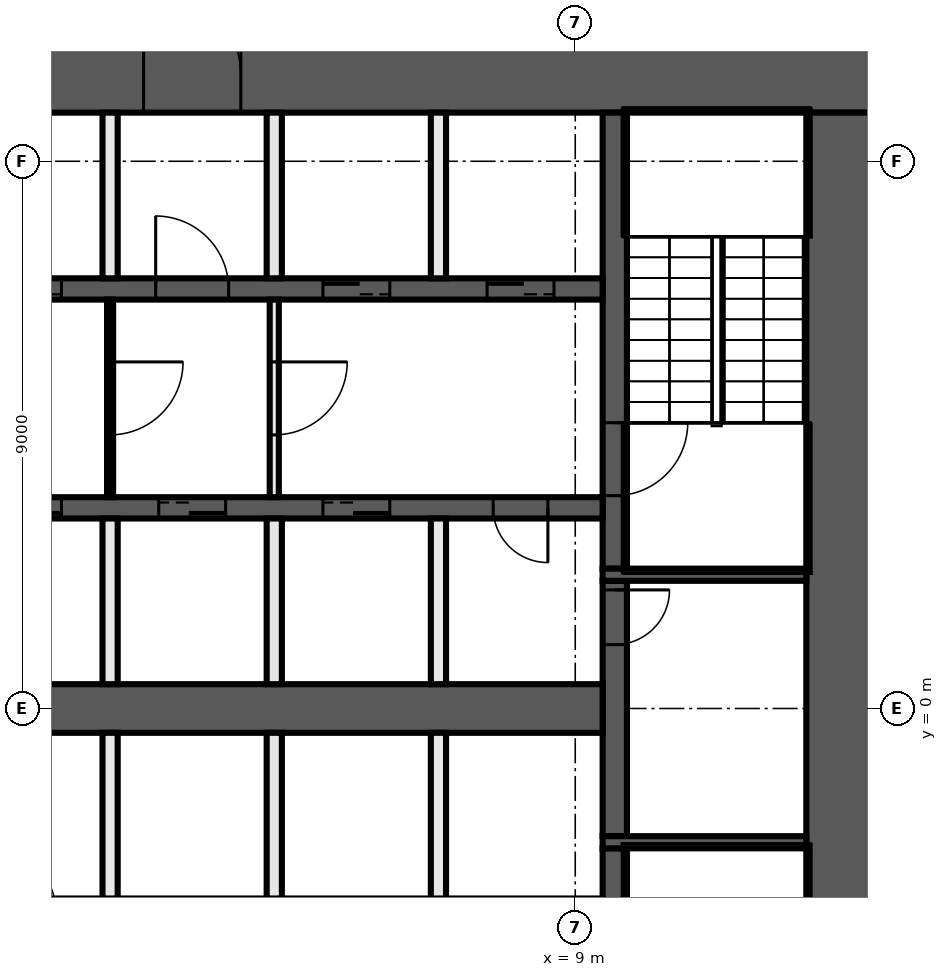
"""IFC4 building model, lengths in metres.
Left out: names, types, materials, properties, quantities, classifications, styles, units other than length and angle.
Written with IfcOpenShell. Run it as: python <this file> out.ifc"""

import sys

from ifc_helpers import new_model, si_unit, direction, frame, frame_2d, origin, place, context, subcontext, project, spatial, rectangle, extrude, element, fill, save


model = new_model("IFC4")
c1 = context("Model", 3, precision=1e-05, world=origin(), true_north=direction((0.0, 1.0)))
c2 = subcontext(c1, "Body", "Model", "MODEL_VIEW")
j1 = project(units=[si_unit("LENGTHUNIT", "METRE"), si_unit("PLANEANGLEUNIT", "RADIAN")], contexts=[c1])
p1 = place(None, origin())
s1 = spatial("IfcSite", under=j1, at=p1, CompositionType="ELEMENT")
p2 = place(p1, origin())
s2 = spatial("IfcBuilding", under=s1, at=p2, CompositionType="ELEMENT")
p3 = place(p2, frame((0.0, 0.0, 9.0)))
s3 = spatial("IfcBuildingStorey", under=s2, at=p3, CompositionType="ELEMENT", Elevation=9.0)
p4 = place(p3, frame((-14.0, 10.4, 0.0), z_axis=(0.0, 0.0, 1.0), x_axis=(1.0, 0.0, 0.0)))
e1 = element("IfcWall", 1, at=p4, inside=s3, PredefinedType="SHEAR", context=c2, shape_type="SweptSolid", body=[
    extrude(rectangle(XDim=28.0, YDim=1.2, at=frame_2d((14.0, 0.0))), origin(), (0.0, 0.0, 1.0), 9.55),
])
p5 = place(p4, frame((15.9, 0.0, 0.0)))
e2 = element("IfcOpeningElement", 2, at=p5, cuts=e1, PredefinedType="OPENING", context=c2, shape_type="SweptSolid", body=[
    extrude(rectangle(XDim=1.6, YDim=2.1, at=frame_2d((0.8, 1.05))), frame((0.0, 0.61, 0.0), z_axis=(0.0, -1.0, 0.0), x_axis=(1.0, 0.0, 0.0)), (0.0, 0.0, 1.0), 1.22),
])
p6 = place(p3, frame((13.4, 9.8, 0.0), z_axis=(0.0, 0.0, 1.0), x_axis=(0.0, -1.0, 0.0)))
e3 = element("IfcWall", 3, at=p6, inside=s3, PredefinedType="SHEAR", context=c2, shape_type="SweptSolid", body=[
    extrude(rectangle(XDim=19.6, YDim=1.2, at=frame_2d((9.8, 0.0))), origin(), (0.0, 0.0, 1.0), 9.55),
])
p7 = place(p3, frame((9.65, -2.3, 0.0), z_axis=(0.0, 0.0, 1.0), x_axis=(0.0, -1.0, 0.0)))
e4 = element("IfcWall", 4, at=p7, inside=s3, PredefinedType="SHEAR", context=c2, shape_type="SweptSolid", body=[
    extrude(rectangle(XDim=7.5, YDim=0.4, at=frame_2d((3.75, 0.0))), origin(), (0.0, 0.0, 1.0), 9.55),
])
p8 = place(p7, frame((1.2, 0.0, 0.0)))
e5 = element("IfcOpeningElement", 5, at=p8, cuts=e4, PredefinedType="OPENING", context=c2, shape_type="SweptSolid", body=[
    extrude(rectangle(XDim=1.2, YDim=2.1, at=frame_2d((0.6, 1.05))), frame((0.0, 0.21, 0.0), z_axis=(0.0, -1.0, 0.0), x_axis=(1.0, 0.0, 0.0)), (0.0, 0.0, 1.0), 0.42),
])
p9 = place(p3, frame((9.65, 2.1, 0.0), z_axis=(0.0, 0.0, 1.0), x_axis=(0.0, -1.0, 0.0)))
e6 = element("IfcWall", 6, at=p9, inside=s3, PredefinedType="SHEAR", context=c2, shape_type="SweptSolid", body=[
    extrude(rectangle(XDim=4.2, YDim=0.4, at=frame_2d((2.1, 0.0))), origin(), (0.0, 0.0, 1.0), 9.55),
])
p10 = place(p9, frame((0.15, 0.0, 0.0)))
e7 = element("IfcOpeningElement", 7, at=p10, cuts=e6, PredefinedType="OPENING", context=c2, shape_type="SweptSolid", body=[
    extrude(rectangle(XDim=0.9, YDim=2.1, at=frame_2d((0.45, 1.05))), frame((0.0, 0.21, 0.0), z_axis=(0.0, -1.0, 0.0), x_axis=(1.0, 0.0, 0.0)), (0.0, 0.0, 1.0), 0.42),
])
p11 = place(p3, frame((9.65, 9.8, 0.0), z_axis=(0.0, 0.0, 1.0), x_axis=(0.0, -1.0, 0.0)))
e8 = element("IfcWall", 8, at=p11, inside=s3, PredefinedType="SHEAR", context=c2, shape_type="SweptSolid", body=[
    extrude(rectangle(XDim=7.5, YDim=0.4, at=frame_2d((3.75, 0.0))), origin(), (0.0, 0.0, 1.0), 9.55),
])
p12 = place(p11, frame((5.1, 0.0, 0.0)))
e9 = element("IfcOpeningElement", 9, at=p12, cuts=e8, PredefinedType="OPENING", context=c2, shape_type="SweptSolid", body=[
    extrude(rectangle(XDim=1.2, YDim=2.1, at=frame_2d((0.6, 1.05))), frame((0.0, 0.21, 0.0), z_axis=(0.0, -1.0, 0.0), x_axis=(1.0, 0.0, 0.0)), (0.0, 0.0, 1.0), 0.42),
])
for number, where, z_axis, x_axis in (
    (10, (9.45, 2.2, 0.0), (0.0, 0.0, 1.0), (1.0, 0.0, 0.0)),
    (11, (9.45, -2.2, 0.0), (0.0, 0.0, 1.0), (1.0, 0.0, 0.0)),
):
    element("IfcWall", number, at=place(p3, frame(where, z_axis=z_axis, x_axis=x_axis)), inside=s3, PredefinedType="SHEAR", context=c2, shape_type="SweptSolid", body=[
        extrude(rectangle(XDim=3.35, YDim=0.2, at=frame_2d((1.675, 0.0))), origin(), (0.0, 0.0, 1.0), 9.55),
    ])
p13 = place(p3, frame((-9.45, 6.9, 0.0), z_axis=(0.0, 0.0, 1.0), x_axis=(1.0, 0.0, 0.0)))
e12 = element("IfcWall", 12, at=p13, inside=s3, PredefinedType="SHEAR", context=c2, shape_type="SweptSolid", body=[
    extrude(rectangle(XDim=18.9, YDim=0.35, at=frame_2d((9.45, 0.0))), origin(), (0.0, 0.0, 1.0), 9.55),
])
p14 = place(p13, frame((0.8, 0.0, 0.0)))
e13 = element("IfcOpeningElement", 13, at=p14, cuts=e12, PredefinedType="OPENING", context=c2, shape_type="SweptSolid", body=[
    extrude(rectangle(XDim=1.1, YDim=2.1, at=frame_2d((0.55, 1.05))), frame((0.0, 0.185, 0.0), z_axis=(0.0, -1.0, 0.0), x_axis=(1.0, 0.0, 0.0)), (0.0, 0.0, 1.0), 0.37),
])
p15 = place(p13, frame((3.5, 0.0, 0.0)))
e14 = element("IfcOpeningElement", 14, at=p15, cuts=e12, PredefinedType="OPENING", context=c2, shape_type="SweptSolid", body=[
    extrude(rectangle(XDim=1.1, YDim=2.1, at=frame_2d((0.55, 1.05))), frame((0.0, 0.185, 0.0), z_axis=(0.0, -1.0, 0.0), x_axis=(1.0, 0.0, 0.0)), (0.0, 0.0, 1.0), 0.37),
])
p16 = place(p13, frame((6.2, 0.0, 0.0)))
e15 = element("IfcOpeningElement", 15, at=p16, cuts=e12, PredefinedType="OPENING", context=c2, shape_type="SweptSolid", body=[
    extrude(rectangle(XDim=1.1, YDim=2.1, at=frame_2d((0.55, 1.05))), frame((0.0, 0.185, 0.0), z_axis=(0.0, -1.0, 0.0), x_axis=(1.0, 0.0, 0.0)), (0.0, 0.0, 1.0), 0.37),
])
p17 = place(p13, frame((8.9, 0.0, 0.0)))
e16 = element("IfcOpeningElement", 16, at=p17, cuts=e12, PredefinedType="OPENING", context=c2, shape_type="SweptSolid", body=[
    extrude(rectangle(XDim=1.1, YDim=2.1, at=frame_2d((0.55, 1.05))), frame((0.0, 0.185, 0.0), z_axis=(0.0, -1.0, 0.0), x_axis=(1.0, 0.0, 0.0)), (0.0, 0.0, 1.0), 0.37),
])
p18 = place(p13, frame((11.55, 0.0, 0.0)))
e17 = element("IfcOpeningElement", 17, at=p18, cuts=e12, PredefinedType="OPENING", context=c2, shape_type="SweptSolid", body=[
    extrude(rectangle(XDim=1.2, YDim=2.1, at=frame_2d((0.6, 1.05))), frame((0.0, 0.185, 0.0), z_axis=(0.0, -1.0, 0.0), x_axis=(1.0, 0.0, 0.0)), (0.0, 0.0, 1.0), 0.37),
])
p19 = place(p13, frame((14.3, 0.0, 0.0)))
e18 = element("IfcOpeningElement", 18, at=p19, cuts=e12, PredefinedType="OPENING", context=c2, shape_type="SweptSolid", body=[
    extrude(rectangle(XDim=1.1, YDim=2.1, at=frame_2d((0.55, 1.05))), frame((0.0, 0.185, 0.0), z_axis=(0.0, -1.0, 0.0), x_axis=(1.0, 0.0, 0.0)), (0.0, 0.0, 1.0), 0.37),
])
p20 = place(p13, frame((17.0, 0.0, 0.0)))
e19 = element("IfcOpeningElement", 19, at=p20, cuts=e12, PredefinedType="OPENING", context=c2, shape_type="SweptSolid", body=[
    extrude(rectangle(XDim=1.1, YDim=2.1, at=frame_2d((0.55, 1.05))), frame((0.0, 0.185, 0.0), z_axis=(0.0, -1.0, 0.0), x_axis=(1.0, 0.0, 0.0)), (0.0, 0.0, 1.0), 0.37),
])
p21 = place(p3, frame((9.45, 3.3, 0.0), z_axis=(0.0, 0.0, 1.0), x_axis=(-1.0, 0.0, 0.0)))
e20 = element("IfcWall", 20, at=p21, inside=s3, PredefinedType="SHEAR", context=c2, shape_type="SweptSolid", body=[
    extrude(rectangle(XDim=18.9, YDim=0.35, at=frame_2d((9.45, 0.0))), origin(), (0.0, 0.0, 1.0), 9.55),
])
p22 = place(p21, frame((17.0, 0.0, 0.0)))
e21 = element("IfcOpeningElement", 21, at=p22, cuts=e20, PredefinedType="OPENING", context=c2, shape_type="SweptSolid", body=[
    extrude(rectangle(XDim=1.1, YDim=2.1, at=frame_2d((0.55, 1.05))), frame((0.0, 0.185, 0.0), z_axis=(0.0, -1.0, 0.0), x_axis=(1.0, 0.0, 0.0)), (0.0, 0.0, 1.0), 0.37),
])
p23 = place(p21, frame((14.3, 0.0, 0.0)))
e22 = element("IfcOpeningElement", 22, at=p23, cuts=e20, PredefinedType="OPENING", context=c2, shape_type="SweptSolid", body=[
    extrude(rectangle(XDim=1.1, YDim=2.1, at=frame_2d((0.55, 1.05))), frame((0.0, 0.185, 0.0), z_axis=(0.0, -1.0, 0.0), x_axis=(1.0, 0.0, 0.0)), (0.0, 0.0, 1.0), 0.37),
])
p24 = place(p21, frame((11.6, 0.0, 0.0)))
e23 = element("IfcOpeningElement", 23, at=p24, cuts=e20, PredefinedType="OPENING", context=c2, shape_type="SweptSolid", body=[
    extrude(rectangle(XDim=1.1, YDim=2.1, at=frame_2d((0.55, 1.05))), frame((0.0, 0.185, 0.0), z_axis=(0.0, -1.0, 0.0), x_axis=(1.0, 0.0, 0.0)), (0.0, 0.0, 1.0), 0.37),
])
p25 = place(p21, frame((8.9, 0.0, 0.0)))
e24 = element("IfcOpeningElement", 24, at=p25, cuts=e20, PredefinedType="OPENING", context=c2, shape_type="SweptSolid", body=[
    extrude(rectangle(XDim=1.1, YDim=2.1, at=frame_2d((0.55, 1.05))), frame((0.0, 0.185, 0.0), z_axis=(0.0, -1.0, 0.0), x_axis=(1.0, 0.0, 0.0)), (0.0, 0.0, 1.0), 0.37),
])
p26 = place(p21, frame((6.2, 0.0, 0.0)))
e25 = element("IfcOpeningElement", 25, at=p26, cuts=e20, PredefinedType="OPENING", context=c2, shape_type="SweptSolid", body=[
    extrude(rectangle(XDim=1.1, YDim=2.1, at=frame_2d((0.55, 1.05))), frame((0.0, 0.185, 0.0), z_axis=(0.0, -1.0, 0.0), x_axis=(1.0, 0.0, 0.0)), (0.0, 0.0, 1.0), 0.37),
])
p27 = place(p21, frame((3.5, 0.0, 0.0)))
e26 = element("IfcOpeningElement", 26, at=p27, cuts=e20, PredefinedType="OPENING", context=c2, shape_type="SweptSolid", body=[
    extrude(rectangle(XDim=1.1, YDim=2.1, at=frame_2d((0.55, 1.05))), frame((0.0, 0.185, 0.0), z_axis=(0.0, -1.0, 0.0), x_axis=(1.0, 0.0, 0.0)), (0.0, 0.0, 1.0), 0.37),
])
p28 = place(p21, frame((0.9, 0.0, 0.0)))
e27 = element("IfcOpeningElement", 27, at=p28, cuts=e20, PredefinedType="OPENING", context=c2, shape_type="SweptSolid", body=[
    extrude(rectangle(XDim=0.9, YDim=2.1, at=frame_2d((0.45, 1.05))), frame((0.0, 0.185, 0.0), z_axis=(0.0, -1.0, 0.0), x_axis=(1.0, 0.0, 0.0)), (0.0, 0.0, 1.0), 0.37),
])
p29 = place(p3, frame((-9.45, 0.0, 0.0), z_axis=(0.0, 0.0, 1.0), x_axis=(1.0, 0.0, 0.0)))
e28 = element("IfcWall", 28, at=p29, inside=s3, PredefinedType="SHEAR", context=c2, shape_type="SweptSolid", body=[
    extrude(rectangle(XDim=18.9, YDim=0.8, at=frame_2d((9.45, 0.0))), origin(), (0.0, 0.0, 1.0), 9.55),
])
for number, where, z_axis, x_axis in (
    (29, (6.75, -3.125, 0.0), (0.0, 0.0, 1.0), (0.0, 1.0, 0.0)),
    (30, (6.75, 0.4, 0.0), (0.0, 0.0, 1.0), (0.0, 1.0, 0.0)),
    (31, (6.75, 7.075, 0.0), (0.0, 0.0, 1.0), (0.0, 1.0, 0.0)),
):
    element("IfcWall", number, at=place(p3, frame(where, z_axis=z_axis, x_axis=x_axis)), inside=s3, PredefinedType="SOLIDWALL", context=c2, shape_type="SweptSolid", body=[
        extrude(rectangle(XDim=2.725, YDim=0.25, at=frame_2d((1.363, 0.0))), origin(), (0.0, 0.0, 1.0), 9.55),
    ])
p30 = place(p3, frame((4.05, 6.725, 0.0), z_axis=(0.0, 0.0, 1.0), x_axis=(0.0, -1.0, 0.0)))
e32 = element("IfcWall", 32, at=p30, inside=s3, PredefinedType="PARTITIONING", context=c2, shape_type="SweptSolid", body=[
    extrude(rectangle(XDim=3.25, YDim=0.15, at=frame_2d((1.625, 0.0))), origin(), (0.0, 0.0, 1.0), 9.55),
])
p31 = place(p30, frame((1.025, 0.0, 0.0)))
e33 = element("IfcOpeningElement", 33, at=p31, cuts=e32, PredefinedType="OPENING", context=c2, shape_type="SweptSolid", body=[
    extrude(rectangle(XDim=1.2, YDim=2.1, at=frame_2d((0.6, 1.05))), frame((0.0, 0.085, 0.0), z_axis=(0.0, -1.0, 0.0), x_axis=(1.0, 0.0, 0.0)), (0.0, 0.0, 1.0), 0.17),
])
for number, where, z_axis, x_axis in (
    (34, (4.05, -3.125, 0.0), (0.0, 0.0, 1.0), (0.0, 1.0, 0.0)),
    (35, (4.05, 0.4, 0.0), (0.0, 0.0, 1.0), (0.0, 1.0, 0.0)),
    (36, (4.05, 7.075, 0.0), (0.0, 0.0, 1.0), (0.0, 1.0, 0.0)),
):
    element("IfcWall", number, at=place(p3, frame(where, z_axis=z_axis, x_axis=x_axis)), inside=s3, PredefinedType="SOLIDWALL", context=c2, shape_type="SweptSolid", body=[
        extrude(rectangle(XDim=2.725, YDim=0.25, at=frame_2d((1.363, 0.0))), origin(), (0.0, 0.0, 1.0), 9.55),
    ])
p32 = place(p3, frame((1.35, 6.725, 0.0), z_axis=(0.0, 0.0, 1.0), x_axis=(0.0, -1.0, 0.0)))
e37 = element("IfcWall", 37, at=p32, inside=s3, PredefinedType="PARTITIONING", context=c2, shape_type="SweptSolid", body=[
    extrude(rectangle(XDim=3.25, YDim=0.1, at=frame_2d((1.625, 0.0))), origin(), (0.0, 0.0, 1.0), 9.55),
])
p33 = place(p32, frame((1.025, 0.0, 0.0)))
e38 = element("IfcOpeningElement", 38, at=p33, cuts=e37, PredefinedType="OPENING", context=c2, shape_type="SweptSolid", body=[
    extrude(rectangle(XDim=1.2, YDim=2.1, at=frame_2d((0.6, 1.05))), frame((0.0, 0.06, 0.0), z_axis=(0.0, -1.0, 0.0), x_axis=(1.0, 0.0, 0.0)), (0.0, 0.0, 1.0), 0.12),
])
for number, where, z_axis, x_axis in (
    (39, (1.35, -3.125, 0.0), (0.0, 0.0, 1.0), (0.0, 1.0, 0.0)),
    (40, (1.35, 0.4, 0.0), (0.0, 0.0, 1.0), (0.0, 1.0, 0.0)),
    (41, (1.35, 7.075, 0.0), (0.0, 0.0, 1.0), (0.0, 1.0, 0.0)),
):
    element("IfcWall", number, at=place(p3, frame(where, z_axis=z_axis, x_axis=x_axis)), inside=s3, PredefinedType="SOLIDWALL", context=c2, shape_type="SweptSolid", body=[
        extrude(rectangle(XDim=2.725, YDim=0.25, at=frame_2d((1.363, 0.0))), origin(), (0.0, 0.0, 1.0), 9.55),
    ])
p34 = place(p10, origin())
e42 = element("IfcDoor", 42, at=p34, inside=s3, OperationType="SINGLE_SWING_RIGHT", PredefinedType="DOOR", context=c2, shape_type="SweptSolid", body=[
    extrude(rectangle(XDim=0.9, YDim=2.1, at=frame_2d((0.45, 1.05))), frame((0.0, 0.025, 0.0), z_axis=(0.0, -1.0, 0.0), x_axis=(1.0, 0.0, 0.0)), (0.0, 0.0, 1.0), 0.05),
])
fill(e7, e42)
p35 = place(p17, origin())
e43 = element("IfcDoor", 43, at=p35, inside=s3, OperationType="DOUBLE_DOOR_SLIDING", PredefinedType="DOOR", context=c2, shape_type="SweptSolid", body=[
    extrude(rectangle(XDim=1.1, YDim=2.1, at=frame_2d((0.55, 1.05))), frame((0.0, 0.025, 0.0), z_axis=(0.0, -1.0, 0.0), x_axis=(1.0, 0.0, 0.0)), (0.0, 0.0, 1.0), 0.05),
])
fill(e16, e43)
p36 = place(p5, origin())
e44 = element("IfcDoor", 44, at=p36, inside=s3, OperationType="DOUBLE_DOOR_SINGLE_SWING", PredefinedType="DOOR", context=c2, shape_type="SweptSolid", body=[
    extrude(rectangle(XDim=1.6, YDim=2.1, at=frame_2d((0.8, 1.05))), frame((0.0, 0.025, 0.0), z_axis=(0.0, -1.0, 0.0), x_axis=(1.0, 0.0, 0.0)), (0.0, 0.0, 1.0), 0.05),
])
fill(e2, e44)
p37 = place(p18, origin())
e45 = element("IfcDoor", 45, at=p37, inside=s3, OperationType="SINGLE_SWING_LEFT", PredefinedType="DOOR", context=c2, shape_type="SweptSolid", body=[
    extrude(rectangle(XDim=1.2, YDim=2.1, at=frame_2d((0.6, 1.05))), frame((0.0, 0.025, 0.0), z_axis=(0.0, -1.0, 0.0), x_axis=(1.0, 0.0, 0.0)), (0.0, 0.0, 1.0), 0.05),
])
fill(e17, e45)
p38 = place(p19, origin())
e46 = element("IfcDoor", 46, at=p38, inside=s3, OperationType="DOUBLE_DOOR_SLIDING", PredefinedType="DOOR", context=c2, shape_type="SweptSolid", body=[
    extrude(rectangle(XDim=1.1, YDim=2.1, at=frame_2d((0.55, 1.05))), frame((0.0, 0.025, 0.0), z_axis=(0.0, -1.0, 0.0), x_axis=(1.0, 0.0, 0.0)), (0.0, 0.0, 1.0), 0.05),
])
fill(e18, e46)
p39 = place(p20, origin())
e47 = element("IfcDoor", 47, at=p39, inside=s3, OperationType="DOUBLE_DOOR_SLIDING", PredefinedType="DOOR", context=c2, shape_type="SweptSolid", body=[
    extrude(rectangle(XDim=1.1, YDim=2.1, at=frame_2d((0.55, 1.05))), frame((0.0, 0.025, 0.0), z_axis=(0.0, -1.0, 0.0), x_axis=(1.0, 0.0, 0.0)), (0.0, 0.0, 1.0), 0.05),
])
fill(e19, e47)
p40 = place(p25, origin())
e48 = element("IfcDoor", 48, at=p40, inside=s3, OperationType="DOUBLE_DOOR_SLIDING", PredefinedType="DOOR", context=c2, shape_type="SweptSolid", body=[
    extrude(rectangle(XDim=1.1, YDim=2.1, at=frame_2d((0.55, 1.05))), frame((0.0, 0.025, 0.0), z_axis=(0.0, -1.0, 0.0), x_axis=(1.0, 0.0, 0.0)), (0.0, 0.0, 1.0), 0.05),
])
fill(e24, e48)
p41 = place(p26, origin())
e49 = element("IfcDoor", 49, at=p41, inside=s3, OperationType="DOUBLE_DOOR_SLIDING", PredefinedType="DOOR", context=c2, shape_type="SweptSolid", body=[
    extrude(rectangle(XDim=1.1, YDim=2.1, at=frame_2d((0.55, 1.05))), frame((0.0, 0.025, 0.0), z_axis=(0.0, -1.0, 0.0), x_axis=(1.0, 0.0, 0.0)), (0.0, 0.0, 1.0), 0.05),
])
fill(e25, e49)
p42 = place(p27, origin())
e50 = element("IfcDoor", 50, at=p42, inside=s3, OperationType="DOUBLE_DOOR_SLIDING", PredefinedType="DOOR", context=c2, shape_type="SweptSolid", body=[
    extrude(rectangle(XDim=1.1, YDim=2.1, at=frame_2d((0.55, 1.05))), frame((0.0, 0.025, 0.0), z_axis=(0.0, -1.0, 0.0), x_axis=(1.0, 0.0, 0.0)), (0.0, 0.0, 1.0), 0.05),
])
fill(e26, e50)
p43 = place(p28, origin())
e51 = element("IfcDoor", 51, at=p43, inside=s3, OperationType="SINGLE_SWING_LEFT", PredefinedType="DOOR", context=c2, shape_type="SweptSolid", body=[
    extrude(rectangle(XDim=0.9, YDim=2.1, at=frame_2d((0.45, 1.05))), frame((0.0, 0.025, 0.0), z_axis=(0.0, -1.0, 0.0), x_axis=(1.0, 0.0, 0.0)), (0.0, 0.0, 1.0), 0.05),
])
fill(e27, e51)
p44 = place(p12, origin())
e52 = element("IfcDoor", 52, at=p44, inside=s3, OperationType="SINGLE_SWING_LEFT", PredefinedType="DOOR", context=c2, shape_type="SweptSolid", body=[
    extrude(rectangle(XDim=1.2, YDim=2.1, at=frame_2d((0.6, 1.05))), frame((0.0, 0.025, 0.0), z_axis=(0.0, -1.0, 0.0), x_axis=(1.0, 0.0, 0.0)), (0.0, 0.0, 1.0), 0.05),
])
fill(e9, e52)
p45 = place(p33, origin())
e53 = element("IfcDoor", 53, at=p45, inside=s3, OperationType="SINGLE_SWING_LEFT", PredefinedType="DOOR", context=c2, shape_type="SweptSolid", body=[
    extrude(rectangle(XDim=1.2, YDim=2.1, at=frame_2d((0.6, 1.05))), frame((0.0, 0.025, 0.0), z_axis=(0.0, -1.0, 0.0), x_axis=(1.0, 0.0, 0.0)), (0.0, 0.0, 1.0), 0.05),
])
fill(e38, e53)
p46 = place(p31, origin())
e54 = element("IfcDoor", 54, at=p46, inside=s3, OperationType="SINGLE_SWING_RIGHT", PredefinedType="DOOR", context=c2, shape_type="SweptSolid", body=[
    extrude(rectangle(XDim=1.2, YDim=2.1, at=frame_2d((0.6, 1.05))), frame((0.0, 0.025, 0.0), z_axis=(0.0, -1.0, 0.0), x_axis=(1.0, 0.0, 0.0)), (0.0, 0.0, 1.0), 0.05),
])
fill(e33, e54)
save(model, sys.argv[1])
